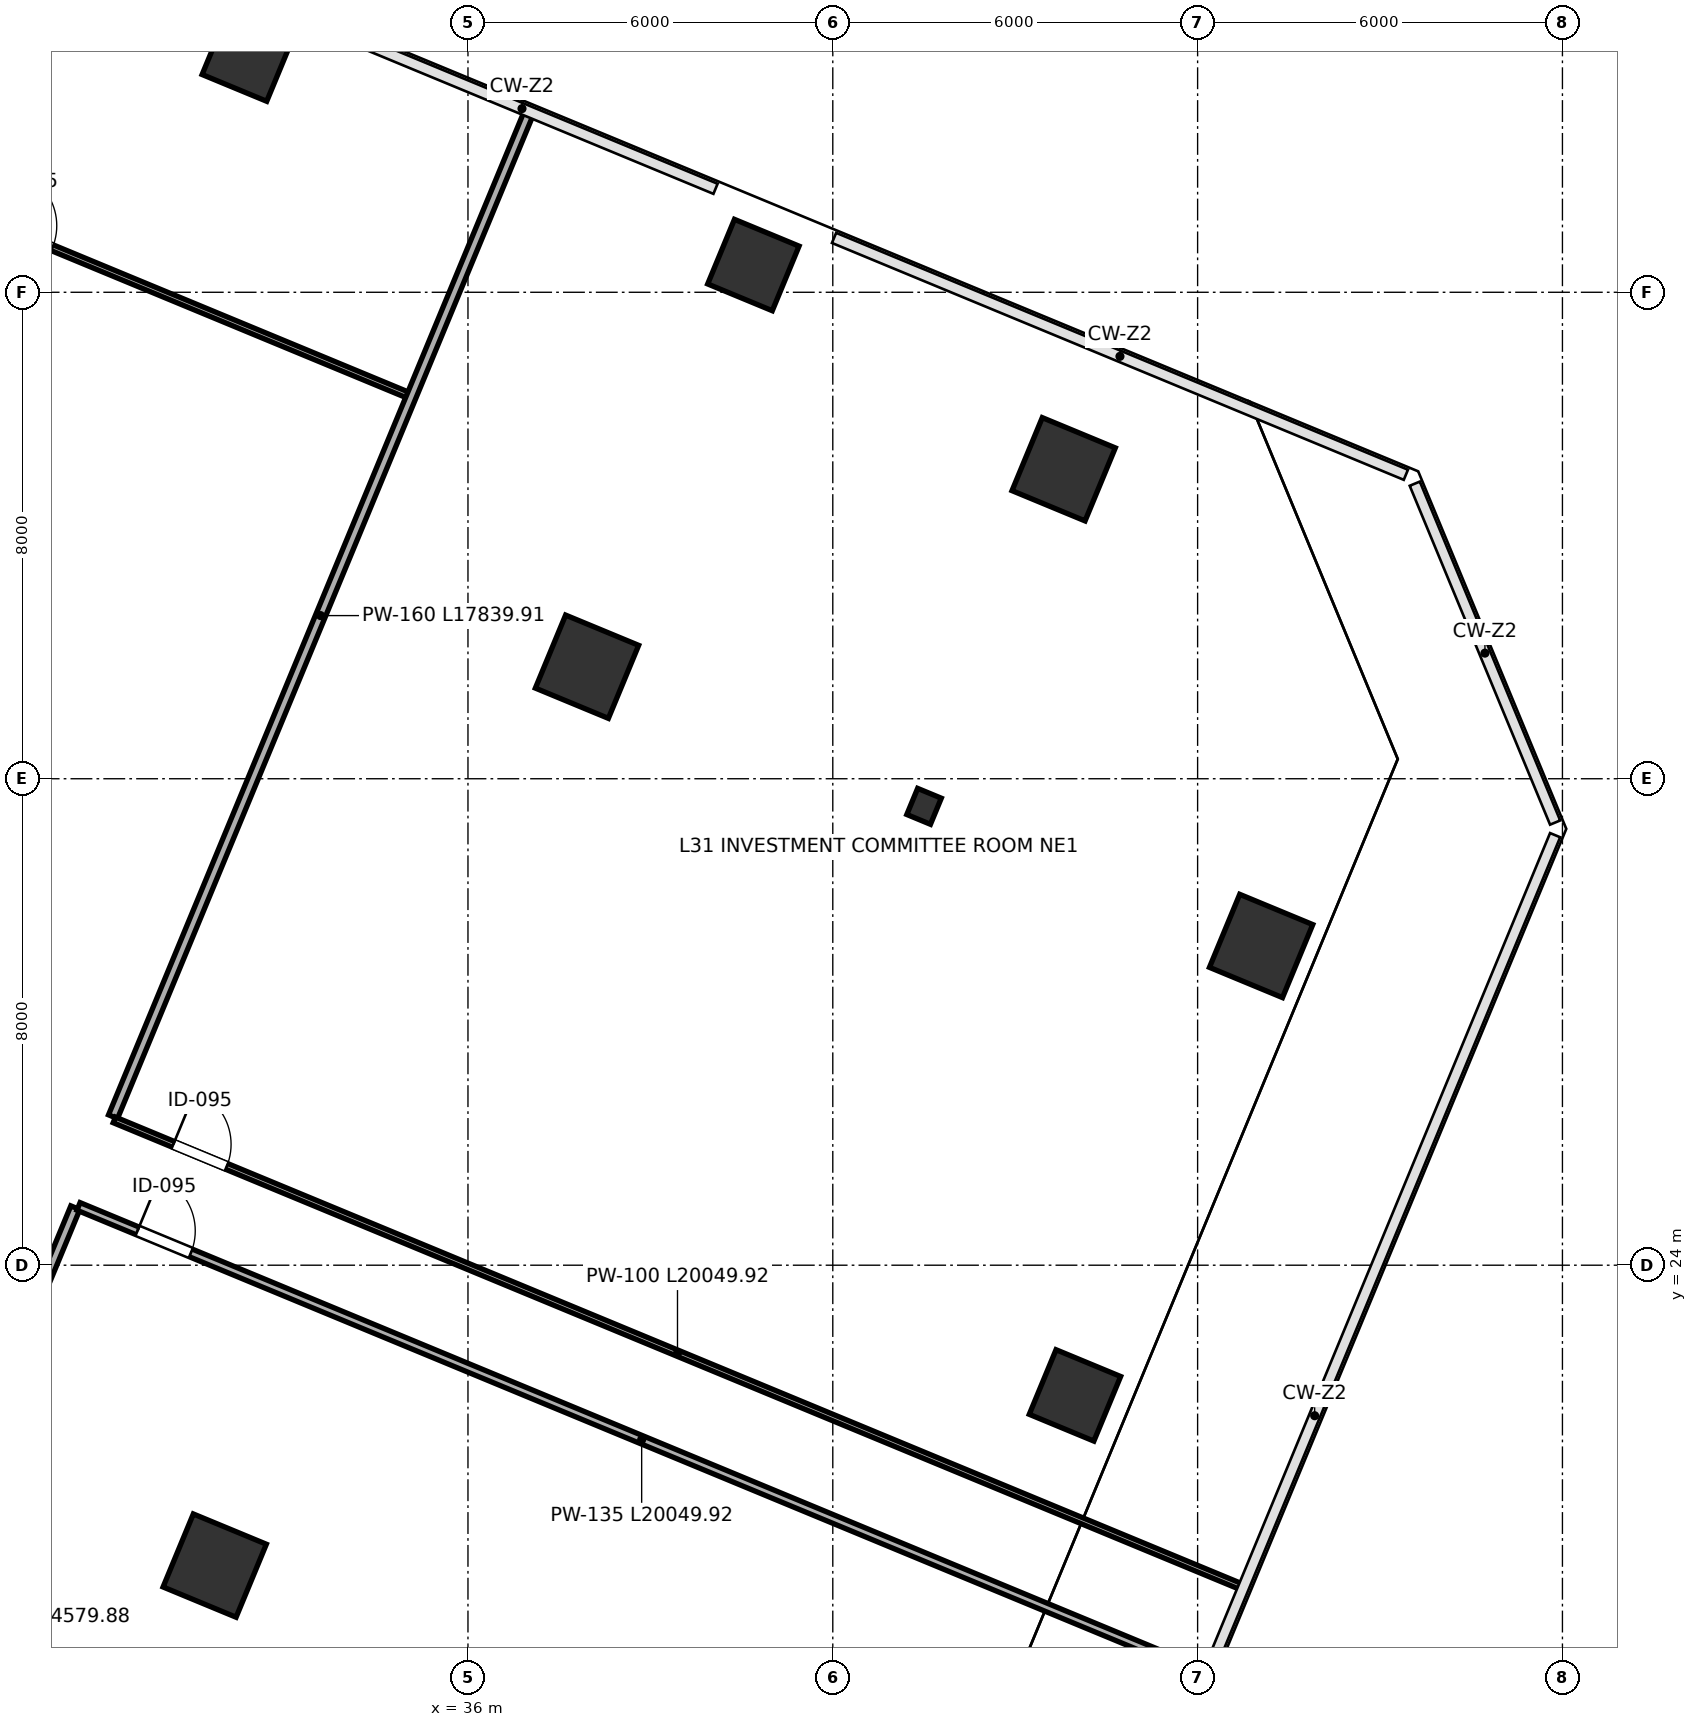
"""IFC4 building model, lengths in metres.
Left out: names, types, materials, properties, quantities, classifications, styles, units other than length and angle.
Written with IfcOpenShell. Run it as: python <this file> out.ifc"""

import sys

from ifc_helpers import new_model, si_unit, direction, frame, frame_2d, origin, origin_2d, place, context, subcontext, project, spatial, rectangle, i_section, extrude, source, transform, mapped, element, fill, save


model = new_model("IFC4")
c1 = context("Model", 3, precision=1e-05, world=origin(), true_north=direction((0.0, 1.0)))
c2 = subcontext(c1, "Body", "Model", "MODEL_VIEW")
j1 = project(units=[si_unit("LENGTHUNIT", "METRE"), si_unit("PLANEANGLEUNIT", "RADIAN")], contexts=[c1])
p1 = place(None, origin())
s1 = spatial("IfcSite", under=j1, at=p1, CompositionType="ELEMENT")
p2 = place(p1, origin())
s2 = spatial("IfcBuilding", under=s1, at=p2, CompositionType="ELEMENT")
p3 = place(p2, frame((0.0, 0.0, 141.4)))
s3 = spatial("IfcBuildingStorey", under=s2, at=p3, CompositionType="ELEMENT", Elevation=141.4)
m1 = source(origin(), c2, "Body", "SweptSolid", [
    extrude(rectangle(XDim=1.15, YDim=1.15, at=origin_2d()), origin(), (0.0, 0.0, 1.0), 4.199),
])
p4 = place(p3, frame((32.379, 43.892, 0.001), z_axis=(0.0, 0.0, 1.0), x_axis=(-0.923879532511, 0.382683432365, 0.0)))
e1 = element("IfcColumn", 1, at=p4, inside=s3, PredefinedType="COLUMN", context=c2, shape_type="MappedRepresentation", body=[
    mapped(m1, transform((0.0, 0.0, 0.0), scale=1.0)),
])
m2 = source(origin(), c2, "Body", "SweptSolid", [
    extrude(rectangle(XDim=1.3, YDim=1.3, at=origin_2d()), origin(), (0.0, 0.0, 1.0), 4.199),
])
for number, where, z_axis, x_axis in (
    (2, (31.835, 19.06, 0.001), (0.0, 0.0, 1.0), (-0.924, 0.383, 0.0)),
    (3, (37.958, 33.842, 0.001), (0.0, 0.0, 1.0), (-0.924, 0.383, 0.0)),
):
    element("IfcColumn", number, at=place(p3, frame(where, z_axis=z_axis, x_axis=x_axis)), inside=s3, PredefinedType="COLUMN", context=c2, shape_type="MappedRepresentation", body=[
        mapped(m2, transform((0.0, 0.0, 0.0), scale=1.0)),
    ])
p5 = place(p3, frame((40.694, 40.448, 0.001), z_axis=(0.0, 0.0, 1.0), x_axis=(-0.923879532511, 0.382683432365, 0.0)))
e4 = element("IfcColumn", 4, at=p5, inside=s3, PredefinedType="COLUMN", context=c2, shape_type="MappedRepresentation", body=[
    mapped(m1, transform((0.0, 0.0, 0.0), scale=1.0)),
])
m3 = source(origin(), c2, "Body", "SweptSolid", [
    extrude(i_section(OverallWidth=0.421, OverallDepth=0.465, WebThickness=0.045, FlangeThickness=0.072, FilletRadius=0.015, at=origin_2d()), origin(), (0.0, 0.0, 1.0), 4.199),
])
p6 = place(p3, frame((43.501, 31.546, 0.001), z_axis=(0.0, 0.0, 1.0), x_axis=(-0.923879532511, 0.382683432365, 0.0)))
e5 = element("IfcColumn", 5, at=p6, inside=s3, PredefinedType="COLUMN", context=c2, shape_type="MappedRepresentation", body=[
    mapped(m3, transform((0.0, 0.0, 0.0), scale=1.0)),
])
p7 = place(p3, frame((45.797, 37.089, 0.001), z_axis=(0.0, 0.0, 1.0), x_axis=(-0.923879532511, 0.382683432365, 0.0)))
e6 = element("IfcColumn", 6, at=p7, inside=s3, PredefinedType="COLUMN", context=c2, shape_type="MappedRepresentation", body=[
    mapped(m2, transform((0.0, 0.0, 0.0), scale=1.0)),
])
p8 = place(p3, frame((45.983, 21.859, 0.001), z_axis=(0.0, 0.0, 1.0), x_axis=(-0.923879532511, 0.382683432365, 0.0)))
e7 = element("IfcColumn", 7, at=p8, inside=s3, PredefinedType="COLUMN", context=c2, shape_type="MappedRepresentation", body=[
    mapped(m1, transform((0.0, 0.0, 0.0), scale=1.0)),
])
m4 = source(origin(), c2, "Body", "SweptSolid", [
    extrude(rectangle(XDim=1.3, YDim=1.3, at=origin_2d()), origin(), (0.0, 0.0, 1.0), 4.199),
])
p9 = place(p3, frame((49.044, 29.25, 0.001), z_axis=(0.0, 0.0, 1.0), x_axis=(-0.923879532511, 0.382683432365, 0.0)))
e8 = element("IfcColumn", 8, at=p9, inside=s3, PredefinedType="COLUMN", context=c2, shape_type="MappedRepresentation", body=[
    mapped(m4, transform((0.0, 0.0, 0.0), scale=1.0)),
])
p10 = place(p3, frame((9.523, 48.867, 0.0), z_axis=(0.0, 0.0, 1.0), x_axis=(0.923882225555, -0.382676930718, 0.0)))
e9 = element("IfcWall", 9, at=p10, inside=s3, PredefinedType="PARTITIONING", context=c2, shape_type="SweptSolid", body=[
    extrude(rectangle(XDim=27.61, YDim=0.1, at=frame_2d((13.805, 0.0))), origin(), (0.0, 0.0, 1.0), 3.96),
])
p11 = place(p10, frame((20.31, 0.0, 0.0)))
e10 = element("IfcOpeningElement", 10, at=p11, cuts=e9, PredefinedType="OPENING", context=c2, shape_type="SweptSolid", body=[
    extrude(rectangle(XDim=0.95, YDim=2.15, at=frame_2d((0.475, 1.075))), frame((0.0, 0.06, 0.0), z_axis=(0.0, -1.0, 0.0), x_axis=(1.0, 0.0, 0.0)), (0.0, 0.0, 1.0), 0.12),
])
p12 = place(p3, frame((30.162, 26.442, 0.0), z_axis=(0.0, 0.0, 1.0), x_axis=(0.382688600046, 0.923877391971, 0.0)))
e11 = element("IfcWall", 11, at=p12, inside=s3, PredefinedType="PARTITIONING", context=c2, shape_type="SweptSolid", body=[
    extrude(rectangle(XDim=17.84, YDim=0.16, at=frame_2d((8.92, 0.0))), origin(), (0.0, 0.0, 1.0), 3.195),
])
p13 = place(p3, frame((23.963, 11.475, 0.0), z_axis=(0.0, 0.0, 1.0), x_axis=(0.382686018031, 0.923878461489, 0.0)))
e12 = element("IfcWall", 12, at=p13, inside=s3, PredefinedType="PARTITIONING", context=c2, shape_type="SweptSolid", body=[
    extrude(rectangle(XDim=14.58, YDim=0.16, at=frame_2d((7.29, 0.0))), origin(), (0.0, 0.0, 1.0), 3.96),
])
p14 = place(p3, frame((30.184, 26.39, 0.0), z_axis=(0.0, 0.0, 1.0), x_axis=(0.923877920754, -0.382687323468, 0.0)))
e13 = element("IfcWall", 13, at=p14, inside=s3, PredefinedType="PARTITIONING", context=c2, shape_type="SweptSolid", body=[
    extrude(rectangle(XDim=20.05, YDim=0.1, at=frame_2d((10.025, 0.0))), origin(), (0.0, 0.0, 1.0), 3.253),
])
p15 = place(p14, frame((1.05, 0.0, 0.0)))
e14 = element("IfcOpeningElement", 14, at=p15, cuts=e13, PredefinedType="OPENING", context=c2, shape_type="SweptSolid", body=[
    extrude(rectangle(XDim=0.95, YDim=2.15, at=frame_2d((0.475, 1.075))), frame((0.0, 0.06, 0.0), z_axis=(0.0, -1.0, 0.0), x_axis=(1.0, 0.0, 0.0)), (0.0, 0.0, 1.0), 0.12),
])
p16 = place(p3, frame((29.595, 24.967, 0.0), z_axis=(0.0, 0.0, 1.0), x_axis=(0.923882225843, -0.382676930022, 0.0)))
e15 = element("IfcWall", 15, at=p16, inside=s3, PredefinedType="PARTITIONING", context=c2, shape_type="SweptSolid", body=[
    extrude(rectangle(XDim=20.05, YDim=0.135, at=frame_2d((10.025, 0.0))), origin(), (0.0, 0.0, 1.0), 3.253),
])
p17 = place(p16, frame((1.05, 0.0, 0.0)))
e16 = element("IfcOpeningElement", 16, at=p17, cuts=e15, PredefinedType="OPENING", context=c2, shape_type="SweptSolid", body=[
    extrude(rectangle(XDim=0.95, YDim=2.15, at=frame_2d((0.475, 1.075))), frame((0.0, 0.078, 0.0), z_axis=(0.0, -1.0, 0.0), x_axis=(1.0, 0.0, 0.0)), (0.0, 0.0, 1.0), 0.155),
])
m5 = source(origin(), c2, "Body", "SweptSolid", [
    extrude(rectangle(XDim=0.95, YDim=2.15, at=frame_2d((0.475, 1.075))), frame((0.0, 0.025, 0.0), z_axis=(0.0, -1.0, 0.0), x_axis=(1.0, 0.0, 0.0)), (0.0, 0.0, 1.0), 0.05),
])
p18 = place(p11, origin())
e17 = element("IfcDoor", 17, at=p18, inside=s3, OperationType="SINGLE_SWING_LEFT", PredefinedType="DOOR", context=c2, shape_type="MappedRepresentation", body=[
    mapped(m5, transform((0.0, 0.0, 0.0), scale=1.0)),
])
fill(e10, e17)
p19 = place(p15, origin())
e18 = element("IfcDoor", 18, at=p19, inside=s3, OperationType="SINGLE_SWING_LEFT", PredefinedType="DOOR", context=c2, shape_type="MappedRepresentation", body=[
    mapped(m5, transform((0.0, 0.0, 0.0), scale=1.0)),
])
fill(e14, e18)
p20 = place(p17, origin())
e19 = element("IfcDoor", 19, at=p20, inside=s3, OperationType="SINGLE_SWING_LEFT", PredefinedType="DOOR", context=c2, shape_type="MappedRepresentation", body=[
    mapped(m5, transform((0.0, 0.0, 0.0), scale=1.0)),
])
fill(e16, e19)
save(model, sys.argv[1])
